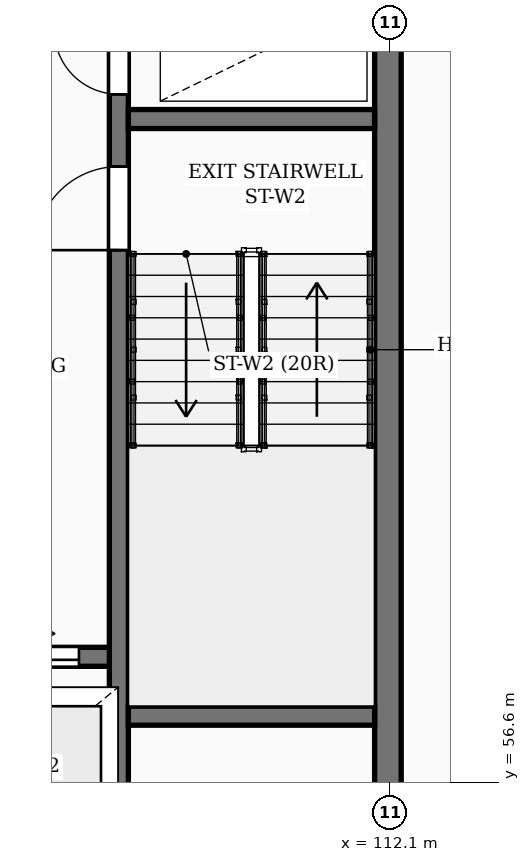
"""IFC4 building model, lengths in metres.
Left out: names, types, materials, properties, quantities, classifications, styles, units other than length and angle.
Written with IfcOpenShell. Run it as: python <this file> out.ifc"""

import sys

from ifc_helpers import new_model, si_unit, direction, frame, frame_2d, origin, place, context, subcontext, project, spatial, rectangle, extrude, element, fill, save


model = new_model("IFC4")
c1 = context("Model", 3, precision=1e-05, world=origin(), true_north=direction((0.0, 1.0)))
c2 = subcontext(c1, "Body", "Model", "MODEL_VIEW")
j1 = project(units=[si_unit("LENGTHUNIT", "METRE"), si_unit("PLANEANGLEUNIT", "RADIAN")], contexts=[c1])
p1 = place(None, origin())
s1 = spatial("IfcSite", under=j1, at=p1, CompositionType="ELEMENT")
p2 = place(p1, origin())
s2 = spatial("IfcBuilding", under=s1, at=p2, CompositionType="ELEMENT")
p3 = place(p2, frame((0.0, 0.0, -3.6)))
s3 = spatial("IfcBuildingStorey", under=s2, at=p3, CompositionType="ELEMENT", Elevation=-3.6)
p4 = place(p3, frame((112.075, 55.375, 0.0), z_axis=(0.0, 0.0, 1.0), x_axis=(0.0, 1.0, 0.0)))
e1 = element("IfcWall", 1, at=p4, inside=s3, PredefinedType="SHEAR", context=c2, shape_type="SweptSolid", body=[
    extrude(rectangle(XDim=11.65, YDim=0.35, at=frame_2d((5.825, 0.0))), origin(), (0.0, 0.0, 1.0), 3.6),
])
p5 = place(p3, frame((106.22, 58.25, 0.0), z_axis=(0.0, 0.0, 1.0), x_axis=(1.0, 0.0, 0.0)))
e2 = element("IfcWall", 2, at=p5, inside=s3, PredefinedType="SHEAR", context=c2, shape_type="SweptSolid", body=[
    extrude(rectangle(XDim=2.46, YDim=0.25, at=frame_2d((1.23, 0.0))), origin(), (0.0, 0.0, 1.0), 3.6),
])
p6 = place(p5, frame((0.67, 0.0, 0.0)))
e3 = element("IfcOpeningElement", 3, at=p6, cuts=e2, PredefinedType="OPENING", context=c2, shape_type="SweptSolid", body=[
    extrude(rectangle(XDim=1.12, YDim=2.12, at=frame_2d((0.56, 1.06))), frame((0.0, 0.135, 0.0), z_axis=(0.0, -1.0, 0.0), x_axis=(1.0, 0.0, 0.0)), (0.0, 0.0, 1.0), 0.27),
])
p7 = place(p3, frame((108.535, 55.4, 0.0), z_axis=(0.0, 0.0, 1.0), x_axis=(0.0, 1.0, 0.0)))
e4 = element("IfcWall", 4, at=p7, inside=s3, PredefinedType="SHEAR", context=c2, shape_type="SweptSolid", body=[
    extrude(rectangle(XDim=11.6, YDim=0.25, at=frame_2d((5.8, 0.0))), origin(), (0.0, 0.0, 1.0), 3.6),
])
p8 = place(p7, frame((8.2, 0.0, 0.0)))
e5 = element("IfcOpeningElement", 5, at=p8, cuts=e4, PredefinedType="OPENING", context=c2, shape_type="SweptSolid", body=[
    extrude(rectangle(XDim=1.1, YDim=2.1, at=frame_2d((0.55, 1.05))), frame((0.0, 0.135, 0.0), z_axis=(0.0, -1.0, 0.0), x_axis=(1.0, 0.0, 0.0)), (0.0, 0.0, 1.0), 0.27),
])
p9 = place(p7, frame((10.25, 0.0, 0.0)))
e6 = element("IfcOpeningElement", 6, at=p9, cuts=e4, PredefinedType="OPENING", context=c2, shape_type="SweptSolid", body=[
    extrude(rectangle(XDim=0.85, YDim=2.05, at=frame_2d((0.425, 1.025))), frame((0.0, 0.135, 0.0), z_axis=(0.0, -1.0, 0.0), x_axis=(1.0, 0.0, 0.0)), (0.0, 0.0, 1.0), 0.27),
])
for number, where, z_axis, x_axis in (
    (7, (108.66, 57.475, 0.0), (0.0, 0.0, 1.0), (1.0, 0.0, 0.0)),
    (8, (108.66, 65.325, 0.0), (0.0, 0.0, 1.0), (1.0, 0.0, 0.0)),
):
    element("IfcWall", number, at=place(p3, frame(where, z_axis=z_axis, x_axis=x_axis)), inside=s3, PredefinedType="SHEAR", context=c2, shape_type="SweptSolid", body=[
        extrude(rectangle(XDim=3.24, YDim=0.25, at=frame_2d((1.62, 0.0))), origin(), (0.0, 0.0, 1.0), 3.6),
    ])
p10 = place(p6, origin())
e9 = element("IfcDoor", 9, at=p10, inside=s3, OperationType="SLIDING_TO_RIGHT", PredefinedType="DOOR", context=c2, shape_type="SweptSolid", body=[
    extrude(rectangle(XDim=1.12, YDim=2.12, at=frame_2d((0.56, 1.06))), frame((0.0, 0.025, 0.0), z_axis=(0.0, -1.0, 0.0), x_axis=(1.0, 0.0, 0.0)), (0.0, 0.0, 1.0), 0.05),
])
fill(e3, e9)
p11 = place(p8, origin())
e10 = element("IfcDoor", 10, at=p11, inside=s3, OperationType="SINGLE_SWING_LEFT", PredefinedType="DOOR", context=c2, shape_type="SweptSolid", body=[
    extrude(rectangle(XDim=1.1, YDim=2.1, at=frame_2d((0.55, 1.05))), frame((0.0, 0.025, 0.0), z_axis=(0.0, -1.0, 0.0), x_axis=(1.0, 0.0, 0.0)), (0.0, 0.0, 1.0), 0.05),
])
fill(e5, e10)
p12 = place(p9, origin())
e11 = element("IfcDoor", 11, at=p12, inside=s3, OperationType="SINGLE_SWING_RIGHT", PredefinedType="DOOR", context=c2, shape_type="SweptSolid", body=[
    extrude(rectangle(XDim=0.85, YDim=2.05, at=frame_2d((0.425, 1.025))), frame((0.0, 0.025, 0.0), z_axis=(0.0, -1.0, 0.0), x_axis=(1.0, 0.0, 0.0)), (0.0, 0.0, 1.0), 0.05),
])
fill(e6, e11)
save(model, sys.argv[1])
